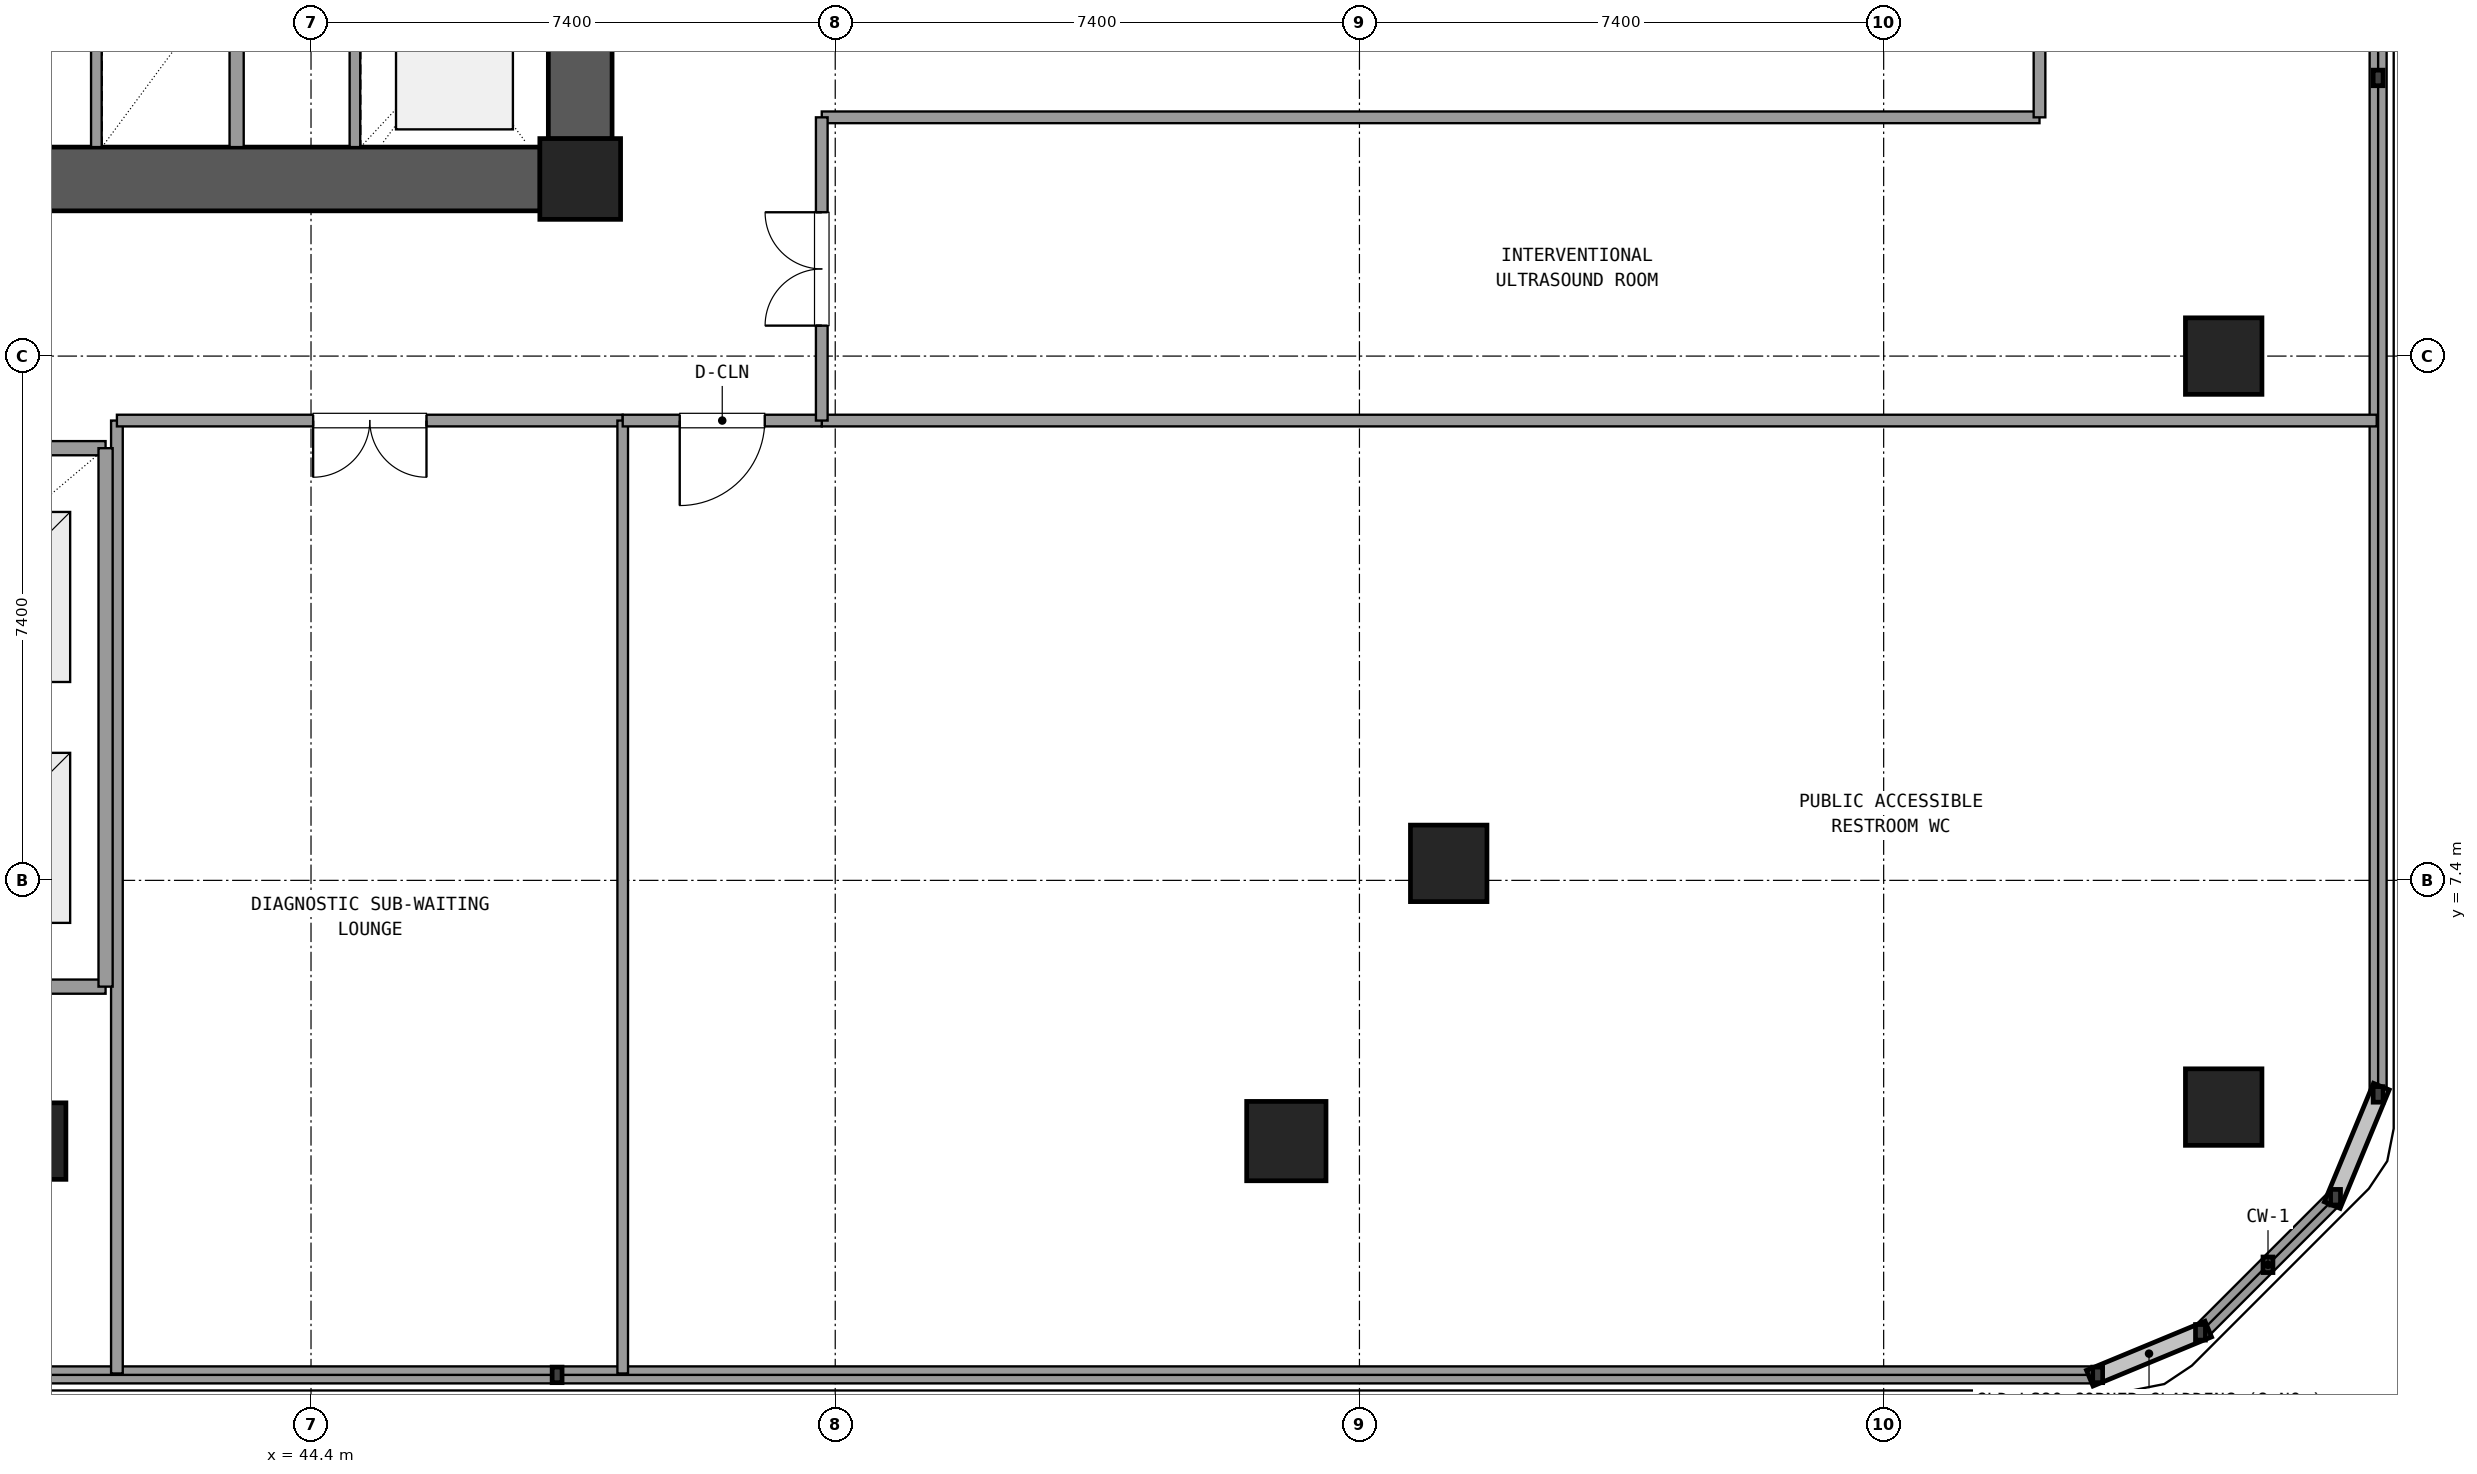
"""IFC4 building model, lengths in metres.
Left out: names, types, materials, properties, quantities, classifications, styles, units other than length and angle.
Written with IfcOpenShell. Run it as: python <this file> out.ifc"""

import sys

from ifc_helpers import new_model, si_unit, direction, frame, frame_2d, origin, origin_2d, place, context, subcontext, project, spatial, rectangle, circle, extrude, element, fill, save


model = new_model("IFC4")
c1 = context("Model", 3, precision=1e-05, world=origin(), true_north=direction((0.0, 1.0)))
c2 = subcontext(c1, "Body", "Model", "MODEL_VIEW")
j1 = project(units=[si_unit("LENGTHUNIT", "METRE"), si_unit("PLANEANGLEUNIT", "RADIAN")], contexts=[c1])
p1 = place(None, origin())
s1 = spatial("IfcSite", under=j1, at=p1, CompositionType="ELEMENT")
p2 = place(p1, origin())
s2 = spatial("IfcBuilding", under=s1, at=p2, CompositionType="ELEMENT")
p3 = place(p2, frame((0.0, 0.0, 9.9)))
s3 = spatial("IfcBuildingStorey", under=s2, at=p3, CompositionType="ELEMENT", Elevation=9.9)
p4 = place(p3, frame((48.2, 17.3, 0.0), z_axis=(0.0, 0.0, 1.0), x_axis=(1.0, 0.0, 0.0)))
e1 = element("IfcColumn", 1, at=p4, inside=s3, PredefinedType="COLUMN", context=c2, shape_type="SweptSolid", body=[
    extrude(rectangle(XDim=1.14, YDim=1.14, at=origin_2d()), origin(), (0.0, 0.0, 1.0), 4.5),
])
p5 = place(p3, frame((37.565, 17.3, 0.0), z_axis=(0.0, 0.0, 1.0), x_axis=(1.0, 0.0, 0.0)))
e2 = element("IfcWall", 2, at=p5, inside=s3, PredefinedType="SHEAR", context=c2, shape_type="SweptSolid", body=[
    extrude(rectangle(XDim=10.07, YDim=0.9, at=frame_2d((5.035, 0.0))), origin(), (0.0, 0.0, 1.0), 4.2),
])
p6 = place(p3, frame((48.2, 17.865, 0.0), z_axis=(0.0, 0.0, 1.0), x_axis=(0.0, 1.0, 0.0)))
e3 = element("IfcWall", 3, at=p6, inside=s3, PredefinedType="SHEAR", context=c2, shape_type="SweptSolid", body=[
    extrude(rectangle(XDim=7.47, YDim=0.9, at=frame_2d((3.735, 0.0))), origin(), (0.0, 0.0, 1.0), 4.2),
])
p7 = place(p6, frame((4.185, 0.0, 0.0)))
e4 = element("IfcOpeningElement", 4, at=p7, cuts=e3, PredefinedType="OPENING", context=c2, shape_type="SweptSolid", body=[
    extrude(rectangle(XDim=1.2, YDim=2.15, at=frame_2d((0.6, 1.075))), frame((0.0, 0.46, 0.0), z_axis=(0.0, -1.0, 0.0), x_axis=(1.0, 0.0, 0.0)), (0.0, 0.0, 1.0), 0.92),
])
p8 = place(p3, frame((40.4, 3.72, 0.0), z_axis=(0.0, 0.0, 1.0), x_axis=(1.0, 0.0, 0.0)))
e5 = element("IfcColumn", 5, at=p8, inside=s3, PredefinedType="COLUMN", context=c2, shape_type="SweptSolid", body=[
    extrude(rectangle(XDim=1.08, YDim=1.08, at=origin_2d()), origin(), (0.0, 0.0, 1.0), 4.5),
])
p9 = place(p3, frame((58.168, 3.72, 0.0), z_axis=(0.0, 0.0, 1.0), x_axis=(1.0, 0.0, 0.0)))
e6 = element("IfcColumn", 6, at=p9, inside=s3, PredefinedType="COLUMN", context=c2, shape_type="SweptSolid", body=[
    extrude(circle(Radius=0.56, at=origin_2d()), origin(), (0.0, 0.0, 1.0), 4.5),
])
for number, where, z_axis, x_axis in (
    (7, (60.46, 7.64, 0.0), (0.0, 0.0, 1.0), (1.0, 0.0, 0.0)),
    (8, (71.4, 4.2, 0.0), (0.0, 0.0, 1.0), (1.0, 0.0, 0.0)),
    (9, (71.4, 14.8, 0.0), (0.0, 0.0, 1.0), (1.0, 0.0, 0.0)),
):
    element("IfcColumn", number, at=place(p3, frame(where, z_axis=z_axis, x_axis=x_axis)), inside=s3, PredefinedType="COLUMN", context=c2, shape_type="SweptSolid", body=[
        extrude(rectangle(XDim=1.08, YDim=1.08, at=origin_2d()), origin(), (0.0, 0.0, 1.0), 4.5),
    ])
p10 = place(p3, frame((4.379, 0.42, 0.0), z_axis=(0.0, 0.0, 1.0), x_axis=(1.0, 0.0, 0.0)))
e10 = element("IfcWall", 10, at=p10, inside=s3, PredefinedType="SOLIDWALL", context=c2, shape_type="SweptSolid", body=[
    extrude(rectangle(XDim=65.242, YDim=0.24, at=frame_2d((32.621, 0.0))), origin(), (0.0, 0.0, 1.0), 0.85),
])
p11 = place(p3, frame((71.072, 1.021, 0.0), z_axis=(0.0, 0.0, 1.0), x_axis=(0.707106781187, 0.707106781187, 0.0)))
e11 = element("IfcWall", 11, at=p11, inside=s3, PredefinedType="SOLIDWALL", context=c2, shape_type="SweptSolid", body=[
    extrude(rectangle(XDim=2.697, YDim=0.24, at=frame_2d((1.348, 0.0))), origin(), (0.0, 0.0, 1.0), 0.85),
])
p12 = place(p3, frame((73.58, 4.379, 0.0), z_axis=(0.0, 0.0, 1.0), x_axis=(0.0, 1.0, 0.0)))
e12 = element("IfcWall", 12, at=p12, inside=s3, PredefinedType="SOLIDWALL", context=c2, shape_type="SweptSolid", body=[
    extrude(rectangle(XDim=43.042, YDim=0.24, at=frame_2d((21.521, 0.0))), origin(), (0.0, 0.0, 1.0), 0.85),
])
p13 = place(p3, frame((43.35, 17.75, 0.0), z_axis=(0.0, 0.0, 1.0), x_axis=(0.0, 1.0, 0.0)))
e13 = element("IfcWall", 13, at=p13, inside=s3, PredefinedType="SOLIDWALL", context=c2, shape_type="SweptSolid", body=[
    extrude(rectangle(XDim=6.9, YDim=0.2, at=frame_2d((3.45, 0.0))), origin(), (0.0, 0.0, 1.0), 3.21),
])
p14 = place(p13, frame((4.15, 0.0, 0.0)))
e14 = element("IfcOpeningElement", 14, at=p14, cuts=e13, PredefinedType="OPENING", context=c2, shape_type="SweptSolid", body=[
    extrude(rectangle(XDim=1.2, YDim=2.15, at=frame_2d((0.6, 1.075))), frame((0.0, 0.11, 0.0), z_axis=(0.0, -1.0, 0.0), x_axis=(1.0, 0.0, 0.0)), (0.0, 0.0, 1.0), 0.22),
])
p15 = place(p3, frame((45.02, 17.75, 0.0), z_axis=(0.0, 0.0, 1.0), x_axis=(0.0, 1.0, 0.0)))
e15 = element("IfcWall", 15, at=p15, inside=s3, PredefinedType="PARTITIONING", context=c2, shape_type="SweptSolid", body=[
    extrude(rectangle(XDim=2.95, YDim=0.15, at=frame_2d((1.475, 0.0))), origin(), (0.0, 0.0, 1.0), 3.21),
])
p16 = place(p3, frame((41.37, 17.75, 0.0), z_axis=(0.0, 0.0, 1.0), x_axis=(0.0, 1.0, 0.0)))
e16 = element("IfcWall", 16, at=p16, inside=s3, PredefinedType="PARTITIONING", context=c2, shape_type="SweptSolid", body=[
    extrude(rectangle(XDim=2.61, YDim=0.15, at=frame_2d((1.305, 0.0))), origin(), (0.0, 0.0, 1.0), 3.21),
])
p17 = place(p3, frame((51.61, 13.89, 0.0), z_axis=(0.0, 0.0, 1.0), x_axis=(1.0, 0.0, 0.0)))
e17 = element("IfcWall", 17, at=p17, inside=s3, PredefinedType="PARTITIONING", context=c2, shape_type="SweptSolid", body=[
    extrude(rectangle(XDim=21.95, YDim=0.165, at=frame_2d((10.975, 0.0))), origin(), (0.0, 0.0, 1.0), 3.21),
])
p18 = place(p3, frame((51.61, 18.17, 0.0), z_axis=(0.0, 0.0, 1.0), x_axis=(1.0, 0.0, 0.0)))
e18 = element("IfcWall", 18, at=p18, inside=s3, PredefinedType="PARTITIONING", context=c2, shape_type="SweptSolid", body=[
    extrude(rectangle(XDim=17.19, YDim=0.165, at=frame_2d((8.595, 0.0))), origin(), (0.0, 0.0, 1.0), 3.21),
])
p19 = place(p3, frame((68.8, 18.17, 0.0), z_axis=(0.0, 0.0, 1.0), x_axis=(0.0, 1.0, 0.0)))
e19 = element("IfcWall", 19, at=p19, inside=s3, PredefinedType="PARTITIONING", context=c2, shape_type="SweptSolid", body=[
    extrude(rectangle(XDim=2.93, YDim=0.165, at=frame_2d((1.465, 0.0))), origin(), (0.0, 0.0, 1.0), 3.21),
])
p20 = place(p3, frame((41.66, 0.44, 0.0), z_axis=(0.0, 0.0, 1.0), x_axis=(0.0, 1.0, 0.0)))
e20 = element("IfcWall", 20, at=p20, inside=s3, PredefinedType="PARTITIONING", context=c2, shape_type="SweptSolid", body=[
    extrude(rectangle(XDim=13.45, YDim=0.165, at=frame_2d((6.725, 0.0))), origin(), (0.0, 0.0, 1.0), 3.21),
])
for number, where, z_axis, x_axis in (
    (21, (32.5, 5.9, 0.0), (0.0, 0.0, 1.0), (1.0, 0.0, 0.0)),
    (22, (32.5, 13.5, 0.0), (0.0, 0.0, 1.0), (1.0, 0.0, 0.0)),
):
    element("IfcWall", number, at=place(p3, frame(where, z_axis=z_axis, x_axis=x_axis)), inside=s3, PredefinedType="SOLIDWALL", context=c2, shape_type="SweptSolid", body=[
        extrude(rectangle(XDim=9.0, YDim=0.2, at=frame_2d((4.5, 0.0))), origin(), (0.0, 0.0, 1.0), 3.21),
    ])
p21 = place(p3, frame((41.5, 5.9, 0.0), z_axis=(0.0, 0.0, 1.0), x_axis=(0.0, 1.0, 0.0)))
e23 = element("IfcWall", 23, at=p21, inside=s3, PredefinedType="SOLIDWALL", context=c2, shape_type="SweptSolid", body=[
    extrude(rectangle(XDim=7.6, YDim=0.2, at=frame_2d((3.8, 0.0))), origin(), (0.0, 0.0, 1.0), 3.21),
])
p22 = place(p3, frame((41.66, 13.89, 0.0), z_axis=(0.0, 0.0, 1.0), x_axis=(1.0, 0.0, 0.0)))
e24 = element("IfcWall", 24, at=p22, inside=s3, PredefinedType="PARTITIONING", context=c2, shape_type="SweptSolid", body=[
    extrude(rectangle(XDim=7.14, YDim=0.165, at=frame_2d((3.57, 0.0))), origin(), (0.0, 0.0, 1.0), 3.21),
])
p23 = place(p22, frame((2.77, 0.0, 0.0)))
e25 = element("IfcOpeningElement", 25, at=p23, cuts=e24, PredefinedType="OPENING", context=c2, shape_type="SweptSolid", body=[
    extrude(rectangle(XDim=1.6, YDim=2.2, at=frame_2d((0.8, 1.1))), frame((0.0, 0.093, 0.0), z_axis=(0.0, -1.0, 0.0), x_axis=(1.0, 0.0, 0.0)), (0.0, 0.0, 1.0), 0.185),
])
p24 = place(p3, frame((48.8, 0.44, 0.0), z_axis=(0.0, 0.0, 1.0), x_axis=(0.0, 1.0, 0.0)))
e26 = element("IfcWall", 26, at=p24, inside=s3, PredefinedType="PARTITIONING", context=c2, shape_type="SweptSolid", body=[
    extrude(rectangle(XDim=13.45, YDim=0.15, at=frame_2d((6.725, 0.0))), origin(), (0.0, 0.0, 1.0), 3.21),
])
p25 = place(p3, frame((48.8, 13.89, 0.0), z_axis=(0.0, 0.0, 1.0), x_axis=(1.0, 0.0, 0.0)))
e27 = element("IfcWall", 27, at=p25, inside=s3, PredefinedType="PARTITIONING", context=c2, shape_type="SweptSolid", body=[
    extrude(rectangle(XDim=2.81, YDim=0.165, at=frame_2d((1.405, 0.0))), origin(), (0.0, 0.0, 1.0), 3.21),
])
p26 = place(p25, frame((0.805, 0.0, 0.0)))
e28 = element("IfcOpeningElement", 28, at=p26, cuts=e27, PredefinedType="OPENING", context=c2, shape_type="SweptSolid", body=[
    extrude(rectangle(XDim=1.2, YDim=2.15, at=frame_2d((0.6, 1.075))), frame((0.0, 0.093, 0.0), z_axis=(0.0, -1.0, 0.0), x_axis=(1.0, 0.0, 0.0)), (0.0, 0.0, 1.0), 0.185),
])
p27 = place(p3, frame((51.61, 13.89, 0.0), z_axis=(0.0, 0.0, 1.0), x_axis=(0.0, 1.0, 0.0)))
e29 = element("IfcWall", 29, at=p27, inside=s3, PredefinedType="PARTITIONING", context=c2, shape_type="SweptSolid", body=[
    extrude(rectangle(XDim=4.28, YDim=0.165, at=frame_2d((2.14, 0.0))), origin(), (0.0, 0.0, 1.0), 3.21),
])
p28 = place(p27, frame((1.34, 0.0, 0.0)))
e30 = element("IfcOpeningElement", 30, at=p28, cuts=e29, PredefinedType="OPENING", context=c2, shape_type="SweptSolid", body=[
    extrude(rectangle(XDim=1.6, YDim=2.2, at=frame_2d((0.8, 1.1))), frame((0.0, 0.093, 0.0), z_axis=(0.0, -1.0, 0.0), x_axis=(1.0, 0.0, 0.0)), (0.0, 0.0, 1.0), 0.185),
])
p29 = place(p3, frame((0.0, 0.0, -0.3)))
p30 = place(p29, frame((39.8, 8.0, -0.01)))
p31 = place(p30, frame((0.0, 0.0, 0.29)))
e31 = element("IfcWindow", 31, at=p31, inside=s3, PartitioningType="SINGLE_PANEL", PredefinedType="SKYLIGHT", context=c2, shape_type="SweptSolid", body=[
    extrude(rectangle(XDim=2.4, YDim=2.4, at=origin_2d()), origin(), (0.0, 0.0, 1.0), 0.02),
])
p32 = place(p29, frame((39.8, 11.4, -0.01)))
p33 = place(p32, frame((0.0, 0.0, 0.29)))
e32 = element("IfcWindow", 32, at=p33, inside=s3, PartitioningType="SINGLE_PANEL", PredefinedType="SKYLIGHT", context=c2, shape_type="SweptSolid", body=[
    extrude(rectangle(XDim=2.4, YDim=2.4, at=origin_2d()), origin(), (0.0, 0.0, 1.0), 0.02),
])
p34 = place(p23, frame((1.6, 0.0, 0.0), z_axis=(0.0, 0.0, 1.0), x_axis=(-1.0, 0.0, 0.0)))
e33 = element("IfcDoor", 33, at=p34, inside=s3, OperationType="DOUBLE_DOOR_SINGLE_SWING", PredefinedType="DOOR", context=c2, shape_type="SweptSolid", body=[
    extrude(rectangle(XDim=1.6, YDim=2.2, at=frame_2d((0.8, 1.1))), frame((0.0, 0.025, 0.0), z_axis=(0.0, -1.0, 0.0), x_axis=(1.0, 0.0, 0.0)), (0.0, 0.0, 1.0), 0.05),
])
fill(e25, e33)
p35 = place(p26, frame((1.2, 0.0, 0.0), z_axis=(0.0, 0.0, 1.0), x_axis=(-1.0, 0.0, 0.0)))
e34 = element("IfcDoor", 34, at=p35, inside=s3, OperationType="SINGLE_SWING_LEFT", PredefinedType="DOOR", context=c2, shape_type="SweptSolid", body=[
    extrude(rectangle(XDim=1.2, YDim=2.15, at=frame_2d((0.6, 1.075))), frame((0.0, 0.025, 0.0), z_axis=(0.0, -1.0, 0.0), x_axis=(1.0, 0.0, 0.0)), (0.0, 0.0, 1.0), 0.05),
])
fill(e28, e34)
p36 = place(p28, origin())
e35 = element("IfcDoor", 35, at=p36, inside=s3, OperationType="DOUBLE_DOOR_SINGLE_SWING", PredefinedType="DOOR", context=c2, shape_type="SweptSolid", body=[
    extrude(rectangle(XDim=1.6, YDim=2.2, at=frame_2d((0.8, 1.1))), frame((0.0, 0.025, 0.0), z_axis=(0.0, -1.0, 0.0), x_axis=(1.0, 0.0, 0.0)), (0.0, 0.0, 1.0), 0.05),
])
fill(e30, e35)
save(model, sys.argv[1])
